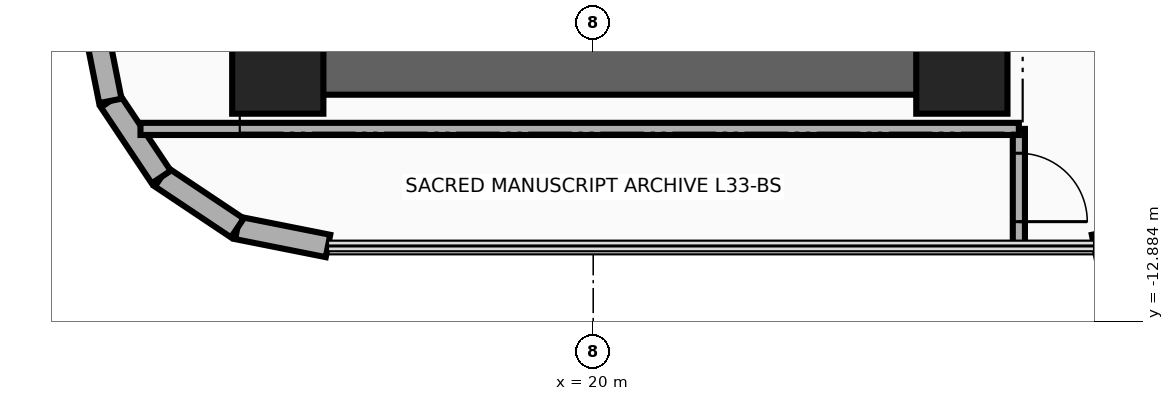
"""IFC4 building model, lengths in metres.
Left out: names, types, materials, properties, quantities, classifications, styles, units other than length and angle.
Written with IfcOpenShell. Run it as: python <this file> out.ifc"""

import sys

from ifc_helpers import new_model, si_unit, direction, frame, frame_2d, origin, origin_2d, place, context, subcontext, project, spatial, rectangle, extrude, source, transform, mapped, element, fill, save


model = new_model("IFC4")
c1 = context("Model", 3, precision=1e-05, world=origin(), true_north=direction((0.0, 1.0)))
c2 = subcontext(c1, "Body", "Model", "MODEL_VIEW")
j1 = project(units=[si_unit("LENGTHUNIT", "METRE"), si_unit("PLANEANGLEUNIT", "RADIAN")], contexts=[c1])
p1 = place(None, origin())
s1 = spatial("IfcSite", under=j1, at=p1, CompositionType="ELEMENT")
p2 = place(p1, origin())
s2 = spatial("IfcBuilding", under=s1, at=p2, CompositionType="ELEMENT")
p3 = place(p2, frame((0.0, 0.0, 131.6)))
s3 = spatial("IfcBuildingStorey", under=s2, at=p3, CompositionType="ELEMENT", Elevation=131.6)
p4 = place(p3, frame((24.85, -9.9, 0.0), z_axis=(0.0, 0.0, 1.0), x_axis=(0.0, 1.0, 0.0)))
e1 = element("IfcWall", 1, at=p4, inside=s3, PredefinedType="SHEAR", context=c2, shape_type="SweptSolid", body=[
    extrude(rectangle(XDim=8.95, YDim=0.7, at=frame_2d((4.475, 0.0))), origin(), (0.0, 0.0, 1.0), 3.46),
])
p5 = place(p3, frame((15.85, -9.55, 0.0), z_axis=(0.0, 0.0, 1.0), x_axis=(1.0, 0.0, 0.0)))
e2 = element("IfcWall", 2, at=p5, inside=s3, PredefinedType="SHEAR", context=c2, shape_type="SweptSolid", body=[
    extrude(rectangle(XDim=9.0, YDim=0.7, at=frame_2d((4.5, 0.0))), origin(), (0.0, 0.0, 1.0), 3.46),
])
m1 = source(origin(), c2, "Body", "SweptSolid", [
    extrude(rectangle(XDim=1.2, YDim=1.2, at=origin_2d()), origin(), (0.0, 0.0, 1.0), 3.7),
])
for number, where, z_axis, x_axis in (
    (3, (15.85, -9.55, 0.0), (0.0, 0.0, 1.0), (1.0, 0.0, 0.0)),
    (4, (24.85, -9.55, 0.0), (0.0, 0.0, 1.0), (1.0, 0.0, 0.0)),
):
    element("IfcColumn", number, at=place(p3, frame(where, z_axis=z_axis, x_axis=x_axis)), inside=s3, PredefinedType="COLUMN", context=c2, shape_type="MappedRepresentation", body=[
        mapped(m1, transform((0.0, 0.0, 0.0), x_axis=(1.0, 0.0, 0.0), y_axis=(0.0, 1.0, 0.0), z_axis=(0.0, 0.0, 1.0), scale=1.0)),
    ])
p6 = place(p3, frame((27.782, -11.653, 0.0), z_axis=(0.0, 0.0, 1.0), x_axis=(-0.980811661072, -0.194957650543, 0.0)))
e5 = element("IfcWall", 5, at=p6, inside=s3, PredefinedType="SOLIDWALL", context=c2, shape_type="SweptSolid", body=[
    extrude(rectangle(XDim=1.216, YDim=0.3, at=frame_2d((0.608, 0.0))), origin(), (0.0, 0.0, 1.0), 3.46),
])
p7 = place(p3, frame((16.511, -11.89, 0.0), z_axis=(0.0, 0.0, 1.0), x_axis=(-0.980804027463, 0.194996050505, 0.0)))
e6 = element("IfcWall", 6, at=p7, inside=s3, PredefinedType="SOLIDWALL", context=c2, shape_type="SweptSolid", body=[
    extrude(rectangle(XDim=1.216, YDim=0.3, at=frame_2d((0.608, 0.0))), origin(), (0.0, 0.0, 1.0), 3.46),
])
for number, where, z_axis, x_axis in (
    (7, (15.318, -11.653, 0.0), (0.0, 0.0, 1.0), (-0.831, 0.556, 0.0)),
    (8, (14.317, -10.983, 0.0), (0.0, 0.0, 1.0), (-0.556, 0.831, 0.0)),
):
    element("IfcWall", number, at=place(p3, frame(where, z_axis=z_axis, x_axis=x_axis)), inside=s3, PredefinedType="SOLIDWALL", context=c2, shape_type="SweptSolid", body=[
        extrude(rectangle(XDim=1.205, YDim=0.3, at=frame_2d((0.603, 0.0))), origin(), (0.0, 0.0, 1.0), 3.46),
    ])
p8 = place(p3, frame((13.647, -9.982, 0.0), z_axis=(0.0, 0.0, 1.0), x_axis=(-0.195189223115, 0.980765602568, 0.0)))
e9 = element("IfcWall", 9, at=p8, inside=s3, PredefinedType="SOLIDWALL", context=c2, shape_type="SweptSolid", body=[
    extrude(rectangle(XDim=1.216, YDim=0.3, at=frame_2d((0.608, 0.0))), origin(), (0.0, 0.0, 1.0), 3.46),
])
p9 = place(p3, frame((25.6, -11.89, 0.0), z_axis=(0.0, 0.0, 1.0), x_axis=(0.0, 1.0, 0.0)))
e10 = element("IfcWall", 10, at=p9, inside=s3, PredefinedType="PARTITIONING", context=c2, shape_type="SweptSolid", body=[
    extrude(rectangle(XDim=1.54, YDim=0.16, at=frame_2d((0.77, 0.0))), origin(), (0.0, 0.0, 1.0), 3.46),
])
p10 = place(p9, frame((0.32, 0.0, 0.0)))
e11 = element("IfcOpeningElement", 11, at=p10, cuts=e10, PredefinedType="OPENING", context=c2, shape_type="SweptSolid", body=[
    extrude(rectangle(XDim=0.9, YDim=2.1, at=frame_2d((0.45, 1.05))), frame((0.0, 0.095, 0.0), z_axis=(0.0, -1.0, 0.0), x_axis=(1.0, 0.0, 0.0)), (0.0, 0.0, 1.0), 0.19),
])
p11 = place(p3, frame((14.044, -10.35, 0.0), z_axis=(0.0, 0.0, 1.0), x_axis=(1.0, 0.0, 0.0)))
e12 = element("IfcWall", 12, at=p11, inside=s3, PredefinedType="PARTITIONING", context=c2, shape_type="SweptSolid", body=[
    extrude(rectangle(XDim=11.556, YDim=0.16, at=frame_2d((5.778, 0.0))), origin(), (0.0, 0.0, 1.0), 3.46),
])
p12 = place(p10, frame((0.9, 0.0, 0.0), z_axis=(0.0, 0.0, 1.0), x_axis=(-1.0, 0.0, 0.0)))
e13 = element("IfcDoor", 13, at=p12, inside=s3, OperationType="SINGLE_SWING_LEFT", PredefinedType="DOOR", context=c2, shape_type="SweptSolid", body=[
    extrude(rectangle(XDim=0.9, YDim=2.1, at=frame_2d((0.45, 1.05))), frame((0.0, 0.025, 0.0), z_axis=(0.0, -1.0, 0.0), x_axis=(1.0, 0.0, 0.0)), (0.0, 0.0, 1.0), 0.05),
])
fill(e11, e13)
save(model, sys.argv[1])
